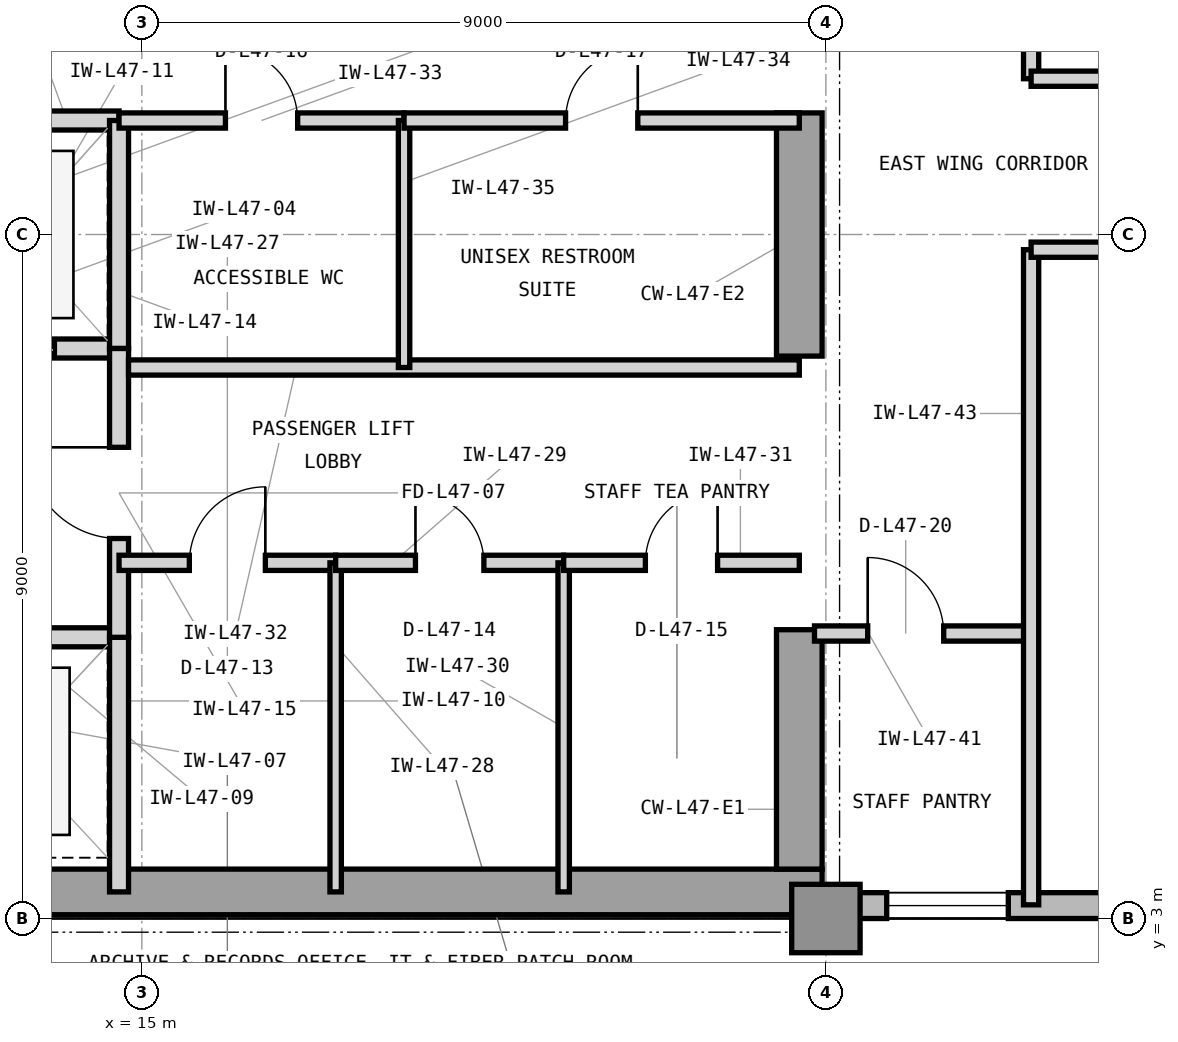
"""IFC4 building model, lengths in metres.
Left out: names, types, materials, properties, quantities, classifications, styles, units other than length and angle.
Written with IfcOpenShell. Run it as: python <this file> out.ifc"""

import sys

from ifc_helpers import new_model, si_unit, direction, frame, frame_2d, origin, origin_2d, place, context, subcontext, project, spatial, rectangle, extrude, element, fill, save


model = new_model("IFC4")
c1 = context("Model", 3, precision=1e-05, world=origin(), true_north=direction((0.0, 1.0)))
c2 = subcontext(c1, "Body", "Model", "MODEL_VIEW")
j1 = project(units=[si_unit("LENGTHUNIT", "METRE"), si_unit("PLANEANGLEUNIT", "RADIAN")], contexts=[c1])
p1 = place(None, origin())
s1 = spatial("IfcSite", under=j1, at=p1, CompositionType="ELEMENT")
p2 = place(p1, origin())
s2 = spatial("IfcBuilding", under=s1, at=p2, CompositionType="ELEMENT")
p3 = place(p2, frame((0.0, 0.0, 195.6)))
s3 = spatial("IfcBuildingStorey", under=s2, at=p3, CompositionType="ELEMENT", Elevation=195.6)
p4 = place(p3, frame((7.475, 3.35, 0.0), z_axis=(0.0, 0.0, 1.0), x_axis=(1.0, 0.0, 0.0)))
e1 = element("IfcWall", 1, at=p4, inside=s3, PredefinedType="SHEAR", context=c2, shape_type="SweptSolid", body=[
    extrude(rectangle(XDim=16.475, YDim=0.6, at=frame_2d((8.237, 0.0))), origin(), (0.0, 0.0, 1.0), 3.9),
])
p5 = place(p3, frame((23.65, 3.65, 0.0), z_axis=(0.0, 0.0, 1.0), x_axis=(0.0, 1.0, 0.0)))
e2 = element("IfcWall", 2, at=p5, inside=s3, PredefinedType="SHEAR", context=c2, shape_type="SweptSolid", body=[
    extrude(rectangle(XDim=3.15, YDim=0.6, at=frame_2d((1.575, 0.0))), origin(), (0.0, 0.0, 1.0), 3.9),
])
p6 = place(p3, frame((23.65, 10.4, 0.0), z_axis=(0.0, 0.0, 1.0), x_axis=(0.0, 1.0, 0.0)))
e3 = element("IfcWall", 3, at=p6, inside=s3, PredefinedType="SHEAR", context=c2, shape_type="SweptSolid", body=[
    extrude(rectangle(XDim=3.2, YDim=0.6, at=frame_2d((1.6, 0.0))), origin(), (0.0, 0.0, 1.0), 3.9),
])
p7 = place(p3, frame((24.0, 3.0, 0.0), z_axis=(0.0, 0.0, 1.0), x_axis=(1.0, 0.0, 0.0)))
e4 = element("IfcColumn", 4, at=p7, inside=s3, PredefinedType="COLUMN", context=c2, shape_type="SweptSolid", body=[
    extrude(rectangle(XDim=0.9, YDim=0.9, at=origin_2d()), origin(), (0.0, 0.0, 1.0), 3.9),
])
p8 = place(p3, frame((23.9, 3.17, 0.0), z_axis=(0.0, 0.0, 1.0), x_axis=(1.0, 0.0, 0.0)))
e5 = element("IfcWall", 5, at=p8, inside=s3, PredefinedType="STANDARD", context=c2, shape_type="SweptSolid", body=[
    extrude(rectangle(XDim=31.5, YDim=0.34, at=frame_2d((15.75, 0.0))), origin(), (0.0, 0.0, 1.0), 3.7),
])
p9 = place(p8, frame((5.6, 0.0, 0.9)))
e6 = element("IfcOpeningElement", 6, at=p9, cuts=e5, PredefinedType="OPENING", context=c2, shape_type="SweptSolid", body=[
    extrude(rectangle(XDim=2.3, YDim=2.2, at=frame_2d((1.15, 1.1))), frame((0.0, 0.18, 0.0), z_axis=(0.0, -1.0, 0.0), x_axis=(1.0, 0.0, 0.0)), (0.0, 0.0, 1.0), 0.36),
])
p10 = place(p8, frame((14.6, 0.0, 0.9)))
e7 = element("IfcOpeningElement", 7, at=p10, cuts=e5, PredefinedType="OPENING", context=c2, shape_type="SweptSolid", body=[
    extrude(rectangle(XDim=2.3, YDim=2.2, at=frame_2d((1.15, 1.1))), frame((0.0, 0.18, 0.0), z_axis=(0.0, -1.0, 0.0), x_axis=(1.0, 0.0, 0.0)), (0.0, 0.0, 1.0), 0.36),
])
p11 = place(p8, frame((0.9, 0.0, 0.9)))
e8 = element("IfcOpeningElement", 8, at=p11, cuts=e5, PredefinedType="OPENING", context=c2, shape_type="SweptSolid", body=[
    extrude(rectangle(XDim=1.6, YDim=2.2, at=frame_2d((0.8, 1.1))), frame((0.0, 0.18, 0.0), z_axis=(0.0, -1.0, 0.0), x_axis=(1.0, 0.0, 0.0)), (0.0, 0.0, 1.0), 0.36),
])
p12 = place(p8, frame((21.725, 0.0, 0.9)))
e9 = element("IfcOpeningElement", 9, at=p12, cuts=e5, PredefinedType="OPENING", context=c2, shape_type="SweptSolid", body=[
    extrude(rectangle(XDim=1.6, YDim=2.2, at=frame_2d((0.8, 1.1))), frame((0.0, 0.18, 0.0), z_axis=(0.0, -1.0, 0.0), x_axis=(1.0, 0.0, 0.0)), (0.0, 0.0, 1.0), 0.36),
])
p13 = place(p3, frame((11.82, 6.7, 0.0), z_axis=(0.0, 0.0, 1.0), x_axis=(1.0, 0.0, 0.0)))
e10 = element("IfcWall", 10, at=p13, inside=s3, PredefinedType="PARTITIONING", context=c2, shape_type="SweptSolid", body=[
    extrude(rectangle(XDim=2.88, YDim=0.25, at=frame_2d((1.44, 0.0))), origin(), (0.0, 0.0, 1.0), 3.283),
])
p14 = place(p13, frame((0.85, 0.0, 0.0)))
e11 = element("IfcOpeningElement", 11, at=p14, cuts=e10, PredefinedType="OPENING", context=c2, shape_type="SweptSolid", body=[
    extrude(rectangle(XDim=1.1, YDim=2.25, at=frame_2d((0.55, 1.125))), frame((0.0, 0.135, 0.0), z_axis=(0.0, -1.0, 0.0), x_axis=(1.0, 0.0, 0.0)), (0.0, 0.0, 1.0), 0.27),
])
p15 = place(p3, frame((14.7, 3.35, 0.0), z_axis=(0.0, 0.0, 1.0), x_axis=(0.0, 1.0, 0.0)))
e12 = element("IfcWall", 12, at=p15, inside=s3, PredefinedType="PARTITIONING", context=c2, shape_type="SweptSolid", body=[
    extrude(rectangle(XDim=3.35, YDim=0.25, at=frame_2d((1.675, 0.0))), origin(), (0.0, 0.0, 1.0), 3.69),
])
p16 = place(p3, frame((11.95, 10.5, 0.0), z_axis=(0.0, 0.0, 1.0), x_axis=(1.0, 0.0, 0.0)))
e13 = element("IfcWall", 13, at=p16, inside=s3, PredefinedType="PARTITIONING", context=c2, shape_type="SweptSolid", body=[
    extrude(rectangle(XDim=2.75, YDim=0.25, at=frame_2d((1.375, 0.0))), origin(), (0.0, 0.0, 1.0), 3.283),
])
p17 = place(p16, frame((0.8, 0.0, 0.0)))
e14 = element("IfcOpeningElement", 14, at=p17, cuts=e13, PredefinedType="OPENING", context=c2, shape_type="SweptSolid", body=[
    extrude(rectangle(XDim=1.1, YDim=2.25, at=frame_2d((0.55, 1.125))), frame((0.0, 0.135, 0.0), z_axis=(0.0, -1.0, 0.0), x_axis=(1.0, 0.0, 0.0)), (0.0, 0.0, 1.0), 0.27),
])
p18 = place(p3, frame((11.95, 13.5, 0.0), z_axis=(0.0, 0.0, 1.0), x_axis=(1.0, 0.0, 0.0)))
e15 = element("IfcWall", 15, at=p18, inside=s3, PredefinedType="PARTITIONING", context=c2, shape_type="SweptSolid", body=[
    extrude(rectangle(XDim=2.75, YDim=0.25, at=frame_2d((1.375, 0.0))), origin(), (0.0, 0.0, 1.0), 3.283),
])
p19 = place(p3, frame((14.7, 10.5, 0.0), z_axis=(0.0, 0.0, 1.0), x_axis=(0.0, 1.0, 0.0)))
e16 = element("IfcWall", 16, at=p19, inside=s3, PredefinedType="PARTITIONING", context=c2, shape_type="SweptSolid", body=[
    extrude(rectangle(XDim=3.0, YDim=0.25, at=frame_2d((1.5, 0.0))), origin(), (0.0, 0.0, 1.0), 3.69),
])
p20 = place(p3, frame((14.7, 6.7, 0.0), z_axis=(0.0, 0.0, 1.0), x_axis=(0.0, 1.0, 0.0)))
e17 = element("IfcWall", 17, at=p20, inside=s3, PredefinedType="PARTITIONING", context=c2, shape_type="SweptSolid", body=[
    extrude(rectangle(XDim=3.8, YDim=0.25, at=frame_2d((1.9, 0.0))), origin(), (0.0, 0.0, 1.0), 3.69),
])
p21 = place(p20, frame((1.3, 0.0, 0.0)))
e18 = element("IfcOpeningElement", 18, at=p21, cuts=e17, PredefinedType="OPENING", context=c2, shape_type="SweptSolid", body=[
    extrude(rectangle(XDim=1.2, YDim=2.2, at=frame_2d((0.6, 1.1))), frame((0.0, 0.135, 0.0), z_axis=(0.0, -1.0, 0.0), x_axis=(1.0, 0.0, 0.0)), (0.0, 0.0, 1.0), 0.27),
])
p22 = place(p3, frame((14.7, 7.68, 0.0), z_axis=(0.0, 0.0, 1.0), x_axis=(1.0, 0.0, 0.0)))
e19 = element("IfcWall", 19, at=p22, inside=s3, PredefinedType="PARTITIONING", context=c2, shape_type="SweptSolid", body=[
    extrude(rectangle(XDim=2.85, YDim=0.2, at=frame_2d((1.425, 0.0))), origin(), (0.0, 0.0, 1.0), 3.69),
])
p23 = place(p22, frame((0.925, 0.0, 0.0)))
e20 = element("IfcOpeningElement", 20, at=p23, cuts=e19, PredefinedType="OPENING", context=c2, shape_type="SweptSolid", body=[
    extrude(rectangle(XDim=1.0, YDim=2.15, at=frame_2d((0.5, 1.075))), frame((0.0, 0.11, 0.0), z_axis=(0.0, -1.0, 0.0), x_axis=(1.0, 0.0, 0.0)), (0.0, 0.0, 1.0), 0.22),
])
p24 = place(p3, frame((17.55, 3.35, 0.0), z_axis=(0.0, 0.0, 1.0), x_axis=(0.0, 1.0, 0.0)))
e21 = element("IfcWall", 21, at=p24, inside=s3, PredefinedType="PARTITIONING", context=c2, shape_type="SweptSolid", body=[
    extrude(rectangle(XDim=4.33, YDim=0.15, at=frame_2d((2.165, 0.0))), origin(), (0.0, 0.0, 1.0), 3.69),
])
p25 = place(p3, frame((17.55, 7.68, 0.0), z_axis=(0.0, 0.0, 1.0), x_axis=(1.0, 0.0, 0.0)))
e22 = element("IfcWall", 22, at=p25, inside=s3, PredefinedType="PARTITIONING", context=c2, shape_type="SweptSolid", body=[
    extrude(rectangle(XDim=3.0, YDim=0.2, at=frame_2d((1.5, 0.0))), origin(), (0.0, 0.0, 1.0), 3.69),
])
p26 = place(p25, frame((1.05, 0.0, 0.0)))
e23 = element("IfcOpeningElement", 23, at=p26, cuts=e22, PredefinedType="OPENING", context=c2, shape_type="SweptSolid", body=[
    extrude(rectangle(XDim=0.9, YDim=2.1, at=frame_2d((0.45, 1.05))), frame((0.0, 0.11, 0.0), z_axis=(0.0, -1.0, 0.0), x_axis=(1.0, 0.0, 0.0)), (0.0, 0.0, 1.0), 0.22),
])
p27 = place(p3, frame((20.55, 3.35, 0.0), z_axis=(0.0, 0.0, 1.0), x_axis=(0.0, 1.0, 0.0)))
e24 = element("IfcWall", 24, at=p27, inside=s3, PredefinedType="PARTITIONING", context=c2, shape_type="SweptSolid", body=[
    extrude(rectangle(XDim=4.33, YDim=0.15, at=frame_2d((2.165, 0.0))), origin(), (0.0, 0.0, 1.0), 3.69),
])
p28 = place(p3, frame((20.55, 7.68, 0.0), z_axis=(0.0, 0.0, 1.0), x_axis=(1.0, 0.0, 0.0)))
e25 = element("IfcWall", 25, at=p28, inside=s3, PredefinedType="PARTITIONING", context=c2, shape_type="SweptSolid", body=[
    extrude(rectangle(XDim=3.1, YDim=0.2, at=frame_2d((1.55, 0.0))), origin(), (0.0, 0.0, 1.0), 3.69),
])
p29 = place(p28, frame((1.075, 0.0, 0.0)))
e26 = element("IfcOpeningElement", 26, at=p29, cuts=e25, PredefinedType="OPENING", context=c2, shape_type="SweptSolid", body=[
    extrude(rectangle(XDim=0.95, YDim=2.1, at=frame_2d((0.475, 1.05))), frame((0.0, 0.11, 0.0), z_axis=(0.0, -1.0, 0.0), x_axis=(1.0, 0.0, 0.0)), (0.0, 0.0, 1.0), 0.22),
])
p30 = place(p3, frame((14.825, 10.25, 0.0), z_axis=(0.0, 0.0, 1.0), x_axis=(1.0, 0.0, 0.0)))
e27 = element("IfcWall", 27, at=p30, inside=s3, PredefinedType="PARTITIONING", context=c2, shape_type="SweptSolid", body=[
    extrude(rectangle(XDim=8.825, YDim=0.2, at=frame_2d((4.413, 0.0))), origin(), (0.0, 0.0, 1.0), 3.69),
])
p31 = place(p3, frame((14.7, 13.5, 0.0), z_axis=(0.0, 0.0, 1.0), x_axis=(1.0, 0.0, 0.0)))
e28 = element("IfcWall", 28, at=p31, inside=s3, PredefinedType="PARTITIONING", context=c2, shape_type="SweptSolid", body=[
    extrude(rectangle(XDim=3.75, YDim=0.2, at=frame_2d((1.875, 0.0))), origin(), (0.0, 0.0, 1.0), 3.283),
])
p32 = place(p31, frame((1.4, 0.0, 0.0)))
e29 = element("IfcOpeningElement", 29, at=p32, cuts=e28, PredefinedType="OPENING", context=c2, shape_type="SweptSolid", body=[
    extrude(rectangle(XDim=0.95, YDim=2.1, at=frame_2d((0.475, 1.05))), frame((0.0, 0.11, 0.0), z_axis=(0.0, -1.0, 0.0), x_axis=(1.0, 0.0, 0.0)), (0.0, 0.0, 1.0), 0.22),
])
p33 = place(p3, frame((18.45, 10.25, 0.0), z_axis=(0.0, 0.0, 1.0), x_axis=(0.0, 1.0, 0.0)))
e30 = element("IfcWall", 30, at=p33, inside=s3, PredefinedType="PARTITIONING", context=c2, shape_type="SweptSolid", body=[
    extrude(rectangle(XDim=3.25, YDim=0.15, at=frame_2d((1.625, 0.0))), origin(), (0.0, 0.0, 1.0), 3.69),
])
p34 = place(p3, frame((18.45, 13.5, 0.0), z_axis=(0.0, 0.0, 1.0), x_axis=(1.0, 0.0, 0.0)))
e31 = element("IfcWall", 31, at=p34, inside=s3, PredefinedType="PARTITIONING", context=c2, shape_type="SweptSolid", body=[
    extrude(rectangle(XDim=5.2, YDim=0.2, at=frame_2d((2.6, 0.0))), origin(), (0.0, 0.0, 1.0), 3.283),
])
p35 = place(p34, frame((2.125, 0.0, 0.0)))
e32 = element("IfcOpeningElement", 32, at=p35, cuts=e31, PredefinedType="OPENING", context=c2, shape_type="SweptSolid", body=[
    extrude(rectangle(XDim=0.95, YDim=2.1, at=frame_2d((0.475, 1.05))), frame((0.0, 0.11, 0.0), z_axis=(0.0, -1.0, 0.0), x_axis=(1.0, 0.0, 0.0)), (0.0, 0.0, 1.0), 0.22),
])
p36 = place(p3, frame((23.85, 6.75, 0.0), z_axis=(0.0, 0.0, 1.0), x_axis=(1.0, 0.0, 0.0)))
e33 = element("IfcWall", 33, at=p36, inside=s3, PredefinedType="PARTITIONING", context=c2, shape_type="SweptSolid", body=[
    extrude(rectangle(XDim=2.85, YDim=0.2, at=frame_2d((1.425, 0.0))), origin(), (0.0, 0.0, 1.0), 3.69),
])
p37 = place(p36, frame((0.7, 0.0, 0.0)))
e34 = element("IfcOpeningElement", 34, at=p37, cuts=e33, PredefinedType="OPENING", context=c2, shape_type="SweptSolid", body=[
    extrude(rectangle(XDim=1.0, YDim=2.15, at=frame_2d((0.5, 1.075))), frame((0.0, 0.11, 0.0), z_axis=(0.0, -1.0, 0.0), x_axis=(1.0, 0.0, 0.0)), (0.0, 0.0, 1.0), 0.22),
])
p38 = place(p3, frame((26.7, 3.18, 0.0), z_axis=(0.0, 0.0, 1.0), x_axis=(0.0, 1.0, 0.0)))
e35 = element("IfcWall", 35, at=p38, inside=s3, PredefinedType="PARTITIONING", context=c2, shape_type="SweptSolid", body=[
    extrude(rectangle(XDim=8.62, YDim=0.2, at=frame_2d((4.31, 0.0))), origin(), (0.0, 0.0, 1.0), 3.69),
])
p39 = place(p3, frame((26.7, 14.05, 0.0), z_axis=(0.0, 0.0, 1.0), x_axis=(0.0, 1.0, 0.0)))
e36 = element("IfcWall", 36, at=p39, inside=s3, PredefinedType="PARTITIONING", context=c2, shape_type="SweptSolid", body=[
    extrude(rectangle(XDim=6.77, YDim=0.2, at=frame_2d((3.385, 0.0))), origin(), (0.0, 0.0, 1.0), 3.69),
])
p40 = place(p3, frame((26.7, 11.8, 0.0), z_axis=(0.0, 0.0, 1.0), x_axis=(1.0, 0.0, 0.0)))
e37 = element("IfcWall", 37, at=p40, inside=s3, PredefinedType="PARTITIONING", context=c2, shape_type="SweptSolid", body=[
    extrude(rectangle(XDim=9.5, YDim=0.2, at=frame_2d((4.75, 0.0))), origin(), (0.0, 0.0, 1.0), 3.69),
])
p41 = place(p40, frame((4.25, 0.0, 0.0)))
e38 = element("IfcOpeningElement", 38, at=p41, cuts=e37, PredefinedType="OPENING", context=c2, shape_type="SweptSolid", body=[
    extrude(rectangle(XDim=1.0, YDim=2.15, at=frame_2d((0.5, 1.075))), frame((0.0, 0.11, 0.0), z_axis=(0.0, -1.0, 0.0), x_axis=(1.0, 0.0, 0.0)), (0.0, 0.0, 1.0), 0.22),
])
p42 = place(p3, frame((26.7, 14.05, 0.0), z_axis=(0.0, 0.0, 1.0), x_axis=(1.0, 0.0, 0.0)))
e39 = element("IfcWall", 39, at=p42, inside=s3, PredefinedType="PARTITIONING", context=c2, shape_type="SweptSolid", body=[
    extrude(rectangle(XDim=8.5, YDim=0.2, at=frame_2d((4.25, 0.0))), origin(), (0.0, 0.0, 1.0), 3.69),
])
p43 = place(p42, frame((3.5, 0.0, 0.0)))
e40 = element("IfcOpeningElement", 40, at=p43, cuts=e39, PredefinedType="OPENING", context=c2, shape_type="SweptSolid", body=[
    extrude(rectangle(XDim=1.5, YDim=2.3, at=frame_2d((0.75, 1.15))), frame((0.0, 0.11, 0.0), z_axis=(0.0, -1.0, 0.0), x_axis=(1.0, 0.0, 0.0)), (0.0, 0.0, 1.0), 0.22),
])
p44 = place(p17, origin())
e41 = element("IfcDoor", 41, at=p44, inside=s3, OperationType="DOUBLE_DOOR_SLIDING", PredefinedType="DOOR", context=c2, shape_type="SweptSolid", body=[
    extrude(rectangle(XDim=1.1, YDim=2.25, at=frame_2d((0.55, 1.125))), frame((0.0, 0.025, 0.0), z_axis=(0.0, -1.0, 0.0), x_axis=(1.0, 0.0, 0.0)), (0.0, 0.0, 1.0), 0.05),
])
fill(e14, e41)
p45 = place(p21, origin())
e42 = element("IfcDoor", 42, at=p45, inside=s3, OperationType="SINGLE_SWING_RIGHT", PredefinedType="DOOR", context=c2, shape_type="SweptSolid", body=[
    extrude(rectangle(XDim=1.2, YDim=2.2, at=frame_2d((0.6, 1.1))), frame((0.0, 0.025, 0.0), z_axis=(0.0, -1.0, 0.0), x_axis=(1.0, 0.0, 0.0)), (0.0, 0.0, 1.0), 0.05),
])
fill(e18, e42)
p46 = place(p23, origin())
e43 = element("IfcDoor", 43, at=p46, inside=s3, OperationType="SINGLE_SWING_RIGHT", PredefinedType="DOOR", context=c2, shape_type="SweptSolid", body=[
    extrude(rectangle(XDim=1.0, YDim=2.15, at=frame_2d((0.5, 1.075))), frame((0.0, 0.025, 0.0), z_axis=(0.0, -1.0, 0.0), x_axis=(1.0, 0.0, 0.0)), (0.0, 0.0, 1.0), 0.05),
])
fill(e20, e43)
p47 = place(p26, origin())
e44 = element("IfcDoor", 44, at=p47, inside=s3, OperationType="SINGLE_SWING_LEFT", PredefinedType="TRAPDOOR", context=c2, shape_type="SweptSolid", body=[
    extrude(rectangle(XDim=0.9, YDim=2.1, at=frame_2d((0.45, 1.05))), frame((0.0, 0.025, 0.0), z_axis=(0.0, -1.0, 0.0), x_axis=(1.0, 0.0, 0.0)), (0.0, 0.0, 1.0), 0.05),
])
fill(e23, e44)
p48 = place(p29, origin())
e45 = element("IfcDoor", 45, at=p48, inside=s3, OperationType="SINGLE_SWING_RIGHT", PredefinedType="DOOR", context=c2, shape_type="SweptSolid", body=[
    extrude(rectangle(XDim=0.95, YDim=2.1, at=frame_2d((0.475, 1.05))), frame((0.0, 0.025, 0.0), z_axis=(0.0, -1.0, 0.0), x_axis=(1.0, 0.0, 0.0)), (0.0, 0.0, 1.0), 0.05),
])
fill(e26, e45)
p49 = place(p32, origin())
e46 = element("IfcDoor", 46, at=p49, inside=s3, OperationType="SINGLE_SWING_LEFT", PredefinedType="DOOR", context=c2, shape_type="SweptSolid", body=[
    extrude(rectangle(XDim=0.95, YDim=2.1, at=frame_2d((0.475, 1.05))), frame((0.0, 0.025, 0.0), z_axis=(0.0, -1.0, 0.0), x_axis=(1.0, 0.0, 0.0)), (0.0, 0.0, 1.0), 0.05),
])
fill(e29, e46)
p50 = place(p35, origin())
e47 = element("IfcDoor", 47, at=p50, inside=s3, OperationType="SINGLE_SWING_RIGHT", PredefinedType="DOOR", context=c2, shape_type="SweptSolid", body=[
    extrude(rectangle(XDim=0.95, YDim=2.1, at=frame_2d((0.475, 1.05))), frame((0.0, 0.025, 0.0), z_axis=(0.0, -1.0, 0.0), x_axis=(1.0, 0.0, 0.0)), (0.0, 0.0, 1.0), 0.05),
])
fill(e32, e47)
p51 = place(p37, origin())
e48 = element("IfcDoor", 48, at=p51, inside=s3, OperationType="SINGLE_SWING_LEFT", PredefinedType="DOOR", context=c2, shape_type="SweptSolid", body=[
    extrude(rectangle(XDim=1.0, YDim=2.15, at=frame_2d((0.5, 1.075))), frame((0.0, 0.025, 0.0), z_axis=(0.0, -1.0, 0.0), x_axis=(1.0, 0.0, 0.0)), (0.0, 0.0, 1.0), 0.05),
])
fill(e34, e48)
p52 = place(p11, origin())
e49 = element("IfcWindow", 49, at=p52, inside=s3, PartitioningType="SINGLE_PANEL", PredefinedType="WINDOW", context=c2, shape_type="SweptSolid", body=[
    extrude(rectangle(XDim=1.6, YDim=2.2, at=frame_2d((0.8, 1.1))), frame((0.0, 0.11, 0.0), z_axis=(0.0, -1.0, 0.0), x_axis=(1.0, 0.0, 0.0)), (0.0, 0.0, 1.0), 0.06),
])
fill(e8, e49)
save(model, sys.argv[1])
